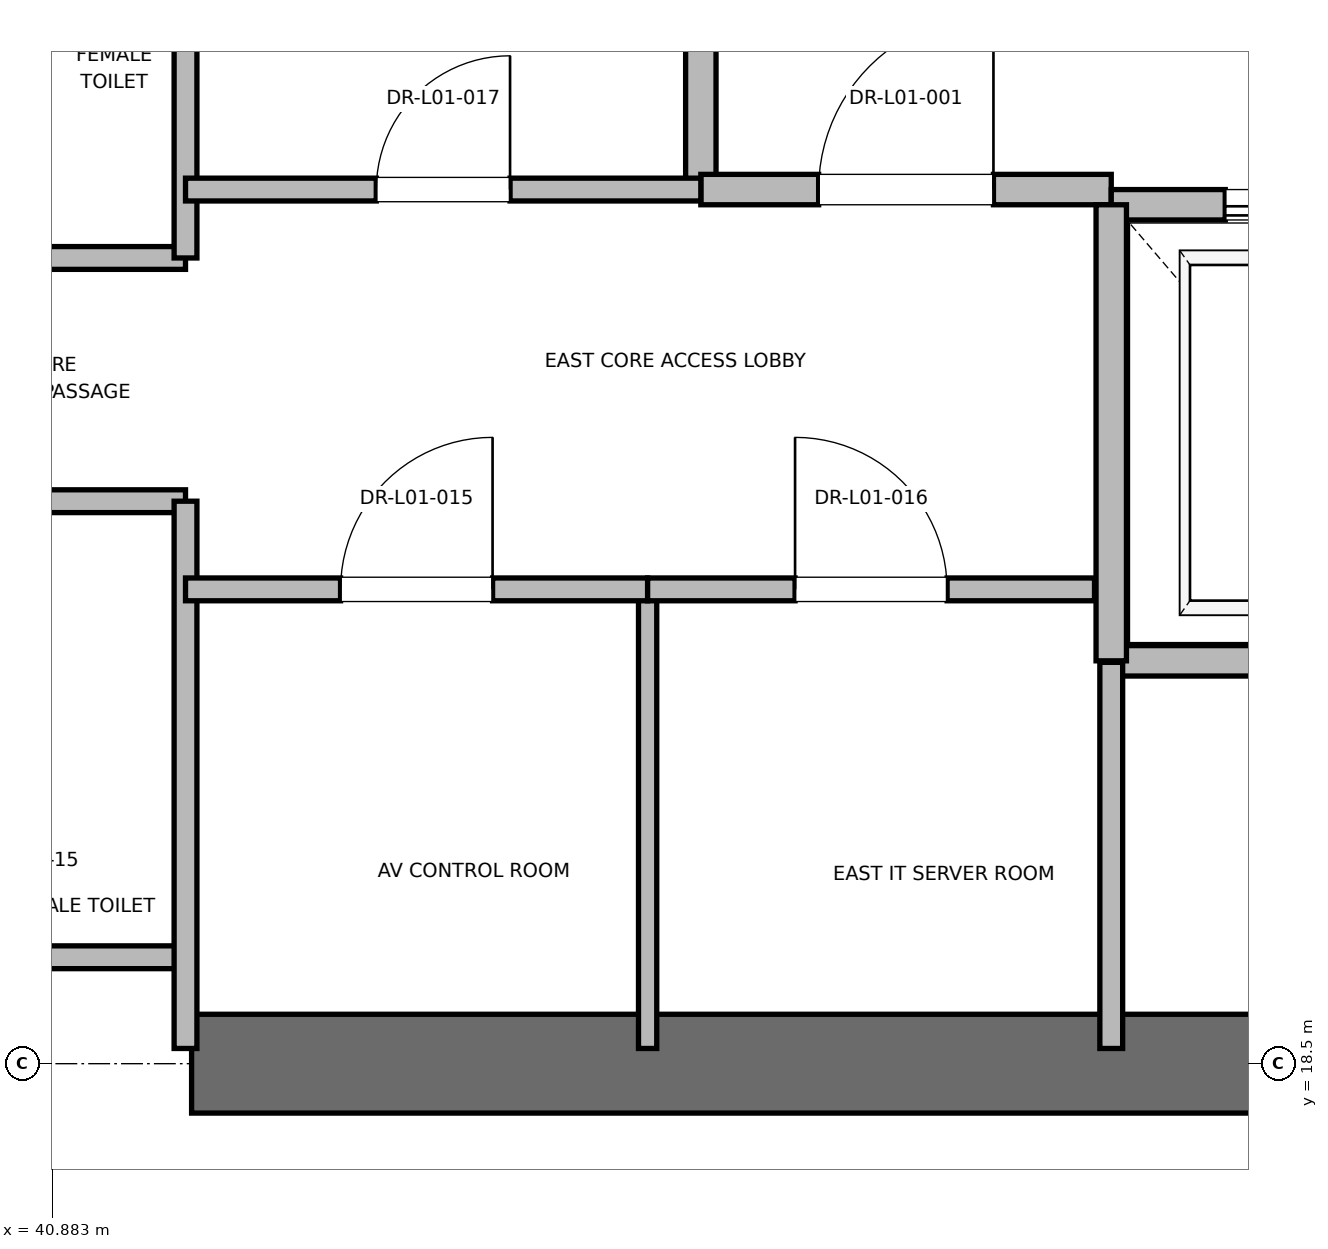
"""IFC4 building model, lengths in metres.
Left out: names, types, materials, properties, quantities, classifications, styles, units other than length and angle.
Written with IfcOpenShell. Run it as: python <this file> out.ifc"""

import sys

from ifc_helpers import new_model, si_unit, direction, frame, frame_2d, origin, place, context, subcontext, project, spatial, rectangle, extrude, element, fill, save


model = new_model("IFC4")
c1 = context("Model", 3, precision=1e-05, world=origin(), true_north=direction((0.0, 1.0)))
c2 = subcontext(c1, "Body", "Model", "MODEL_VIEW")
j1 = project(units=[si_unit("LENGTHUNIT", "METRE"), si_unit("PLANEANGLEUNIT", "RADIAN")], contexts=[c1])
p1 = place(None, origin())
s1 = spatial("IfcSite", under=j1, at=p1, CompositionType="ELEMENT")
p2 = place(p1, origin())
s2 = spatial("IfcBuilding", under=s1, at=p2, CompositionType="ELEMENT")
p3 = place(p2, frame((0.0, 0.0, 6.0)))
s3 = spatial("IfcBuildingStorey", under=s2, at=p3, CompositionType="ELEMENT", Elevation=6.0)
p4 = place(p3, frame((41.8, 18.5, 0.0), z_axis=(0.0, 0.0, 1.0), x_axis=(1.0, 0.0, 0.0)))
e1 = element("IfcWall", 1, at=p4, inside=s3, PredefinedType="SHEAR", context=c2, shape_type="SweptSolid", body=[
    extrude(rectangle(XDim=9.2, YDim=0.65, at=frame_2d((4.6, 0.0))), origin(), (0.0, 0.0, 1.0), 4.92),
])
p5 = place(p3, frame((45.15, 24.25, 0.0), z_axis=(0.0, 0.0, 1.0), x_axis=(0.0, 1.0, 0.0)))
e2 = element("IfcWall", 2, at=p5, inside=s3, PredefinedType="PARTITIONING", context=c2, shape_type="SweptSolid", body=[
    extrude(rectangle(XDim=3.37, YDim=0.2, at=frame_2d((1.685, 0.0))), origin(), (0.0, 0.0, 1.0), 4.92),
])
p6 = place(p3, frame((45.15, 24.25, 0.0), z_axis=(0.0, 0.0, 1.0), x_axis=(1.0, 0.0, 0.0)))
e3 = element("IfcWall", 3, at=p6, inside=s3, PredefinedType="PARTITIONING", context=c2, shape_type="SweptSolid", body=[
    extrude(rectangle(XDim=2.7, YDim=0.2, at=frame_2d((1.35, 0.0))), origin(), (0.0, 0.0, 1.0), 4.92),
])
p7 = place(p6, frame((0.775, 0.0, 0.0)))
e4 = element("IfcOpeningElement", 4, at=p7, cuts=e3, PredefinedType="OPENING", context=c2, shape_type="SweptSolid", body=[
    extrude(rectangle(XDim=1.15, YDim=2.2, at=frame_2d((0.575, 1.1))), frame((0.0, 0.1, 0.0), z_axis=(0.0, -1.0, 0.0), x_axis=(1.0, 0.0, 0.0)), (0.0, 0.0, 1.0), 0.2),
])
p8 = place(p3, frame((47.85, 21.15, 0.0), z_axis=(0.0, 0.0, 1.0), x_axis=(1.0, 0.0, 0.0)))
e5 = element("IfcWall", 5, at=p8, inside=s3, PredefinedType="SOLIDWALL", context=c2, shape_type="SweptSolid", body=[
    extrude(rectangle(XDim=2.6, YDim=0.2, at=frame_2d((1.3, 0.0))), origin(), (0.0, 0.0, 1.0), 4.92),
])
p9 = place(p3, frame((50.45, 24.15, 0.0), z_axis=(0.0, 0.0, 1.0), x_axis=(-1.0, 0.0, 0.0)))
e6 = element("IfcWall", 6, at=p9, inside=s3, PredefinedType="SOLIDWALL", context=c2, shape_type="SweptSolid", body=[
    extrude(rectangle(XDim=2.6, YDim=0.2, at=frame_2d((1.3, 0.0))), origin(), (0.0, 0.0, 1.0), 3.7),
])
p10 = place(p9, frame((0.75, 0.0, 0.0)))
e7 = element("IfcOpeningElement", 7, at=p10, cuts=e6, PredefinedType="OPENING", context=c2, shape_type="SweptSolid", body=[
    extrude(rectangle(XDim=1.1, YDim=2.2, at=frame_2d((0.55, 1.1))), frame((0.0, 0.1, 0.0), z_axis=(0.0, -1.0, 0.0), x_axis=(1.0, 0.0, 0.0)), (0.0, 0.0, 1.0), 0.2),
])
p11 = place(p3, frame((47.85, 24.15, 0.0), z_axis=(0.0, 0.0, 1.0), x_axis=(0.0, -1.0, 0.0)))
e8 = element("IfcWall", 8, at=p11, inside=s3, PredefinedType="SOLIDWALL", context=c2, shape_type="SweptSolid", body=[
    extrude(rectangle(XDim=3.0, YDim=0.2, at=frame_2d((1.5, 0.0))), origin(), (0.0, 0.0, 1.0), 4.92),
])
for number, where, z_axis, x_axis in (
    (9, (39.95, 19.2, 0.0), (0.0, 0.0, 1.0), (1.0, 0.0, 0.0)),
    (10, (39.95, 22.2, 0.0), (0.0, 0.0, 1.0), (1.0, 0.0, 0.0)),
    (11, (39.95, 23.8, 0.0), (0.0, 0.0, 1.0), (1.0, 0.0, 0.0)),
):
    element("IfcWall", number, at=place(p3, frame(where, z_axis=z_axis, x_axis=x_axis)), inside=s3, PredefinedType="PARTITIONING", context=c2, shape_type="SweptSolid", body=[
        extrude(rectangle(XDim=1.81, YDim=0.15, at=frame_2d((0.905, 0.0))), origin(), (0.0, 0.0, 1.0), 2.85),
    ])
p12 = place(p3, frame((41.76, 18.6, 0.0), z_axis=(0.0, 0.0, 1.0), x_axis=(0.0, 1.0, 0.0)))
e12 = element("IfcWall", 12, at=p12, inside=s3, PredefinedType="PARTITIONING", context=c2, shape_type="SweptSolid", body=[
    extrude(rectangle(XDim=3.6, YDim=0.15, at=frame_2d((1.8, 0.0))), origin(), (0.0, 0.0, 1.0), 2.85),
])
p13 = place(p3, frame((41.76, 23.8, 0.0), z_axis=(0.0, 0.0, 1.0), x_axis=(0.0, 1.0, 0.0)))
e13 = element("IfcWall", 13, at=p13, inside=s3, PredefinedType="PARTITIONING", context=c2, shape_type="SweptSolid", body=[
    extrude(rectangle(XDim=4.0, YDim=0.15, at=frame_2d((2.0, 0.0))), origin(), (0.0, 0.0, 1.0), 2.85),
])
p14 = place(p3, frame((47.85, 18.6, 0.0), z_axis=(0.0, 0.0, 1.0), x_axis=(0.0, 1.0, 0.0)))
e14 = element("IfcWall", 14, at=p14, inside=s3, PredefinedType="PARTITIONING", context=c2, shape_type="SweptSolid", body=[
    extrude(rectangle(XDim=2.54, YDim=0.15, at=frame_2d((1.27, 0.0))), origin(), (0.0, 0.0, 1.0), 2.85),
])
p15 = place(p3, frame((44.8, 18.6, 0.0), z_axis=(0.0, 0.0, 1.0), x_axis=(0.0, 1.0, 0.0)))
e15 = element("IfcWall", 15, at=p15, inside=s3, PredefinedType="PARTITIONING", context=c2, shape_type="SweptSolid", body=[
    extrude(rectangle(XDim=3.02, YDim=0.12, at=frame_2d((1.51, 0.0))), origin(), (0.0, 0.0, 1.0), 2.85),
])
p16 = place(p3, frame((41.76, 21.62, 0.0), z_axis=(0.0, 0.0, 1.0), x_axis=(1.0, 0.0, 0.0)))
e16 = element("IfcWall", 16, at=p16, inside=s3, PredefinedType="PARTITIONING", context=c2, shape_type="SweptSolid", body=[
    extrude(rectangle(XDim=3.04, YDim=0.15, at=frame_2d((1.52, 0.0))), origin(), (0.0, 0.0, 1.0), 2.85),
])
p17 = place(p16, frame((1.02, 0.0, 0.0)))
e17 = element("IfcOpeningElement", 17, at=p17, cuts=e16, PredefinedType="OPENING", context=c2, shape_type="SweptSolid", body=[
    extrude(rectangle(XDim=1.0, YDim=2.15, at=frame_2d((0.5, 1.075))), frame((0.0, 0.075, 0.0), z_axis=(0.0, -1.0, 0.0), x_axis=(1.0, 0.0, 0.0)), (0.0, 0.0, 1.0), 0.15),
])
p18 = place(p3, frame((44.8, 21.62, 0.0), z_axis=(0.0, 0.0, 1.0), x_axis=(1.0, 0.0, 0.0)))
e18 = element("IfcWall", 18, at=p18, inside=s3, PredefinedType="PARTITIONING", context=c2, shape_type="SweptSolid", body=[
    extrude(rectangle(XDim=2.94, YDim=0.15, at=frame_2d((1.47, 0.0))), origin(), (0.0, 0.0, 1.0), 2.85),
])
p19 = place(p18, frame((0.97, 0.0, 0.0)))
e19 = element("IfcOpeningElement", 19, at=p19, cuts=e18, PredefinedType="OPENING", context=c2, shape_type="SweptSolid", body=[
    extrude(rectangle(XDim=1.0, YDim=2.15, at=frame_2d((0.5, 1.075))), frame((0.0, 0.075, 0.0), z_axis=(0.0, -1.0, 0.0), x_axis=(1.0, 0.0, 0.0)), (0.0, 0.0, 1.0), 0.15),
])
p20 = place(p3, frame((41.76, 24.25, 0.0), z_axis=(0.0, 0.0, 1.0), x_axis=(1.0, 0.0, 0.0)))
e20 = element("IfcWall", 20, at=p20, inside=s3, PredefinedType="PARTITIONING", context=c2, shape_type="SweptSolid", body=[
    extrude(rectangle(XDim=3.39, YDim=0.15, at=frame_2d((1.695, 0.0))), origin(), (0.0, 0.0, 1.0), 2.85),
])
p21 = place(p20, frame((1.255, 0.0, 0.0)))
e21 = element("IfcOpeningElement", 21, at=p21, cuts=e20, PredefinedType="OPENING", context=c2, shape_type="SweptSolid", body=[
    extrude(rectangle(XDim=0.88, YDim=2.1, at=frame_2d((0.44, 1.05))), frame((0.0, 0.075, 0.0), z_axis=(0.0, -1.0, 0.0), x_axis=(1.0, 0.0, 0.0)), (0.0, 0.0, 1.0), 0.15),
])
p22 = place(p7, origin())
e22 = element("IfcDoor", 22, at=p22, inside=s3, OperationType="SINGLE_SWING_RIGHT", PredefinedType="DOOR", context=c2, shape_type="SweptSolid", body=[
    extrude(rectangle(XDim=1.15, YDim=2.2, at=frame_2d((0.575, 1.1))), frame((0.0, 0.025, 0.0), z_axis=(0.0, -1.0, 0.0), x_axis=(1.0, 0.0, 0.0)), (0.0, 0.0, 1.0), 0.05),
])
fill(e4, e22)
p23 = place(p10, origin())
e23 = element("IfcDoor", 23, at=p23, inside=s3, OperationType="SLIDING_TO_RIGHT", PredefinedType="DOOR", context=c2, shape_type="SweptSolid", body=[
    extrude(rectangle(XDim=1.1, YDim=2.2, at=frame_2d((0.55, 1.1))), frame((0.0, 0.025, 0.0), z_axis=(0.0, -1.0, 0.0), x_axis=(1.0, 0.0, 0.0)), (0.0, 0.0, 1.0), 0.05),
])
fill(e7, e23)
p24 = place(p17, origin())
e24 = element("IfcDoor", 24, at=p24, inside=s3, OperationType="SINGLE_SWING_RIGHT", PredefinedType="DOOR", context=c2, shape_type="SweptSolid", body=[
    extrude(rectangle(XDim=1.0, YDim=2.15, at=frame_2d((0.5, 1.075))), frame((0.0, 0.025, 0.0), z_axis=(0.0, -1.0, 0.0), x_axis=(1.0, 0.0, 0.0)), (0.0, 0.0, 1.0), 0.05),
])
fill(e17, e24)
p25 = place(p19, origin())
e25 = element("IfcDoor", 25, at=p25, inside=s3, OperationType="SINGLE_SWING_LEFT", PredefinedType="DOOR", context=c2, shape_type="SweptSolid", body=[
    extrude(rectangle(XDim=1.0, YDim=2.15, at=frame_2d((0.5, 1.075))), frame((0.0, 0.025, 0.0), z_axis=(0.0, -1.0, 0.0), x_axis=(1.0, 0.0, 0.0)), (0.0, 0.0, 1.0), 0.05),
])
fill(e19, e25)
p26 = place(p21, origin())
e26 = element("IfcDoor", 26, at=p26, inside=s3, OperationType="SINGLE_SWING_RIGHT", PredefinedType="DOOR", context=c2, shape_type="SweptSolid", body=[
    extrude(rectangle(XDim=0.88, YDim=2.1, at=frame_2d((0.44, 1.05))), frame((0.0, 0.025, 0.0), z_axis=(0.0, -1.0, 0.0), x_axis=(1.0, 0.0, 0.0)), (0.0, 0.0, 1.0), 0.05),
])
fill(e21, e26)
save(model, sys.argv[1])
